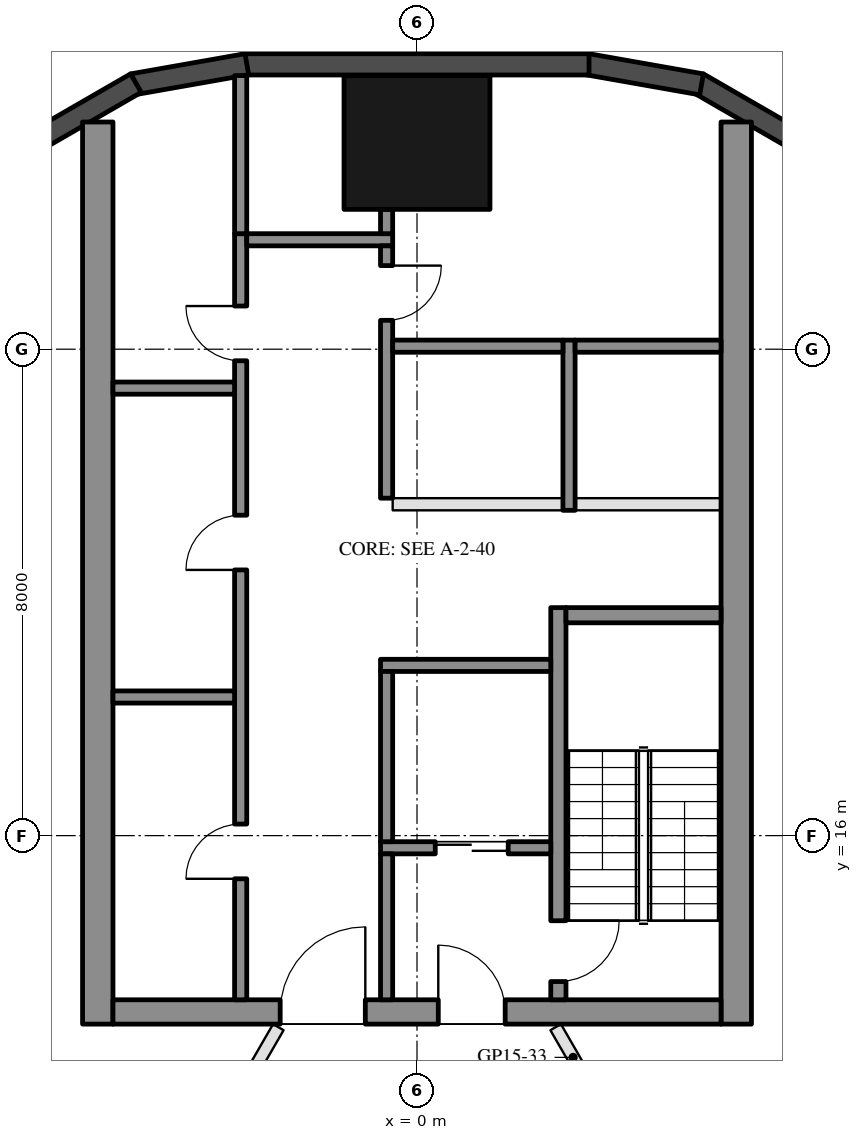
"""IFC4 building model, lengths in metres.
Left out: names, types, materials, properties, quantities, classifications, styles, units other than length and angle.
Written with IfcOpenShell. Run it as: python <this file> out.ifc"""

import sys

from ifc_helpers import new_model, si_unit, direction, frame, frame_2d, origin, origin_2d, place, context, subcontext, project, spatial, rectangle, hollow_rectangle, extrude, element, fill, save


model = new_model("IFC4")
c1 = context("Model", 3, precision=1e-05, world=origin(), true_north=direction((0.0, 1.0)))
c2 = subcontext(c1, "Body", "Model", "MODEL_VIEW")
j1 = project(units=[si_unit("LENGTHUNIT", "METRE"), si_unit("PLANEANGLEUNIT", "RADIAN")], contexts=[c1])
p1 = place(None, origin())
s1 = spatial("IfcSite", under=j1, at=p1, CompositionType="ELEMENT")
p2 = place(p1, origin())
s2 = spatial("IfcBuilding", under=s1, at=p2, CompositionType="ELEMENT")
p3 = place(p2, frame((0.0, 0.0, 172.5)))
s3 = spatial("IfcBuildingStorey", under=s2, at=p3, CompositionType="ELEMENT", Elevation=172.5)
p4 = place(p3, frame((0.0, 27.4, 0.0), z_axis=(0.0, 0.0, 1.0), x_axis=(1.0, 0.0, 0.0)))
e1 = element("IfcColumn", 1, at=p4, inside=s3, PredefinedType="COLUMN", context=c2, shape_type="SweptSolid", body=[
    extrude(hollow_rectangle(XDim=2.4, YDim=2.2, WallThickness=0.06, at=origin_2d()), origin(), (0.0, 0.0, 1.0), 3.7),
])
for number, where, z_axis, x_axis in (
    (2, (6.277, 27.422, 0.0), (0.0, 0.0, 1.0), (-0.866, 0.5, 0.0)),
    (3, (4.68, 28.356, 0.0), (0.0, 0.0, 1.0), (-0.985, 0.174, 0.0)),
):
    element("IfcWall", number, at=place(p3, frame(where, z_axis=z_axis, x_axis=x_axis)), inside=s3, PredefinedType="SOLIDWALL", context=c2, shape_type="SweptSolid", body=[
        extrude(rectangle(XDim=1.91, YDim=0.35, at=frame_2d((0.955, 0.0))), origin(), (0.0, 0.0, 1.0), 3.55),
    ])
p5 = place(p3, frame((2.829, 28.685, 0.0), z_axis=(0.0, 0.0, 1.0), x_axis=(-1.0, 0.0, 0.0)))
e4 = element("IfcWall", 4, at=p5, inside=s3, PredefinedType="SOLIDWALL", context=c2, shape_type="SweptSolid", body=[
    extrude(rectangle(XDim=5.658, YDim=0.35, at=frame_2d((2.829, 0.0))), origin(), (0.0, 0.0, 1.0), 3.55),
])
for number, where, z_axis, x_axis in (
    (5, (-2.799, 28.688, 0.0), (0.0, 0.0, 1.0), (-0.985, -0.174, 0.0)),
    (6, (-4.623, 28.377, 0.0), (0.0, 0.0, 1.0), (-0.866, -0.5, 0.0)),
):
    element("IfcWall", number, at=place(p3, frame(where, z_axis=z_axis, x_axis=x_axis)), inside=s3, PredefinedType="SOLIDWALL", context=c2, shape_type="SweptSolid", body=[
        extrude(rectangle(XDim=1.91, YDim=0.35, at=frame_2d((0.955, 0.0))), origin(), (0.0, 0.0, 1.0), 3.55),
    ])
for number, where, z_axis, x_axis in (
    (7, (5.25, 12.9, 0.0), (0.0, 0.0, 1.0), (0.0, 1.0, 0.0)),
    (8, (-5.25, 12.9, 0.0), (0.0, 0.0, 1.0), (0.0, 1.0, 0.0)),
):
    element("IfcWall", number, at=place(p3, frame(where, z_axis=z_axis, x_axis=x_axis)), inside=s3, PredefinedType="SHEAR", context=c2, shape_type="SweptSolid", body=[
        extrude(rectangle(XDim=14.837, YDim=0.5, at=frame_2d((7.418, 0.0))), origin(), (0.0, 0.0, 1.0), 3.5),
    ])
p6 = place(p3, frame((5.0, 13.1, 0.0), z_axis=(0.0, 0.0, 1.0), x_axis=(-1.0, 0.0, 0.0)))
e9 = element("IfcWall", 9, at=p6, inside=s3, PredefinedType="SHEAR", context=c2, shape_type="SweptSolid", body=[
    extrude(rectangle(XDim=10.0, YDim=0.4, at=frame_2d((5.0, 0.0))), origin(), (0.0, 0.0, 1.0), 3.5),
])
p7 = place(p6, frame((3.55, 0.0, 0.0)))
e10 = element("IfcOpeningElement", 10, at=p7, cuts=e9, PredefinedType="OPENING", context=c2, shape_type="SweptSolid", body=[
    extrude(rectangle(XDim=1.1, YDim=2.1, at=frame_2d((0.55, 1.05))), frame((0.0, 0.21, 0.0), z_axis=(0.0, -1.0, 0.0), x_axis=(1.0, 0.0, 0.0)), (0.0, 0.0, 1.0), 0.42),
])
p8 = place(p6, frame((5.85, 0.0, 0.0)))
e11 = element("IfcOpeningElement", 11, at=p8, cuts=e9, PredefinedType="OPENING", context=c2, shape_type="SweptSolid", body=[
    extrude(rectangle(XDim=1.4, YDim=2.1, at=frame_2d((0.7, 1.05))), frame((0.0, 0.21, 0.0), z_axis=(0.0, -1.0, 0.0), x_axis=(1.0, 0.0, 0.0)), (0.0, 0.0, 1.0), 0.42),
])
p9 = place(p3, frame((2.325, 13.3, 0.0), z_axis=(0.0, 0.0, 1.0), x_axis=(0.0, 1.0, 0.0)))
e12 = element("IfcWall", 12, at=p9, inside=s3, PredefinedType="SHEAR", context=c2, shape_type="SweptSolid", body=[
    extrude(rectangle(XDim=6.45, YDim=0.25, at=frame_2d((3.225, 0.0))), origin(), (0.0, 0.0, 1.0), 3.5),
])
p10 = place(p9, frame((0.3, 0.0, 0.0)))
e13 = element("IfcOpeningElement", 13, at=p10, cuts=e12, PredefinedType="OPENING", context=c2, shape_type="SweptSolid", body=[
    extrude(rectangle(XDim=1.0, YDim=2.1, at=frame_2d((0.5, 1.05))), frame((0.0, 0.135, 0.0), z_axis=(0.0, -1.0, 0.0), x_axis=(1.0, 0.0, 0.0)), (0.0, 0.0, 1.0), 0.27),
])
p11 = place(p3, frame((5.0, 19.625, 0.0), z_axis=(0.0, 0.0, 1.0), x_axis=(-1.0, 0.0, 0.0)))
e14 = element("IfcWall", 14, at=p11, inside=s3, PredefinedType="SHEAR", context=c2, shape_type="SweptSolid", body=[
    extrude(rectangle(XDim=2.55, YDim=0.25, at=frame_2d((1.275, 0.0))), origin(), (0.0, 0.0, 1.0), 3.5),
])
p12 = place(p3, frame((2.2, 18.8, 0.0), z_axis=(0.0, 0.0, 1.0), x_axis=(-1.0, 0.0, 0.0)))
e15 = element("IfcWall", 15, at=p12, inside=s3, PredefinedType="SHEAR", context=c2, shape_type="SweptSolid", body=[
    extrude(rectangle(XDim=2.8, YDim=0.2, at=frame_2d((1.4, 0.0))), origin(), (0.0, 0.0, 1.0), 3.5),
])
p13 = place(p3, frame((2.2, 15.8, 0.0), z_axis=(0.0, 0.0, 1.0), x_axis=(-1.0, 0.0, 0.0)))
e16 = element("IfcWall", 16, at=p13, inside=s3, PredefinedType="SHEAR", context=c2, shape_type="SweptSolid", body=[
    extrude(rectangle(XDim=2.8, YDim=0.2, at=frame_2d((1.4, 0.0))), origin(), (0.0, 0.0, 1.0), 3.5),
])
p14 = place(p13, frame((0.7, 0.0, 0.0)))
e17 = element("IfcOpeningElement", 17, at=p14, cuts=e16, PredefinedType="OPENING", context=c2, shape_type="SweptSolid", body=[
    extrude(rectangle(XDim=1.2, YDim=2.1, at=frame_2d((0.6, 1.05))), frame((0.0, 0.11, 0.0), z_axis=(0.0, -1.0, 0.0), x_axis=(1.0, 0.0, 0.0)), (0.0, 0.0, 1.0), 0.22),
])
p15 = place(p3, frame((-0.5, 15.9, 0.0), z_axis=(0.0, 0.0, 1.0), x_axis=(0.0, 1.0, 0.0)))
e18 = element("IfcWall", 18, at=p15, inside=s3, PredefinedType="SHEAR", context=c2, shape_type="SweptSolid", body=[
    extrude(rectangle(XDim=2.8, YDim=0.2, at=frame_2d((1.4, 0.0))), origin(), (0.0, 0.0, 1.0), 3.5),
])
p16 = place(p3, frame((-0.5, 13.3, 0.0), z_axis=(0.0, 0.0, 1.0), x_axis=(0.0, 1.0, 0.0)))
e19 = element("IfcWall", 19, at=p16, inside=s3, PredefinedType="SHEAR", context=c2, shape_type="SweptSolid", body=[
    extrude(rectangle(XDim=2.4, YDim=0.2, at=frame_2d((1.2, 0.0))), origin(), (0.0, 0.0, 1.0), 3.5),
])
p17 = place(p3, frame((-2.9, 13.3, 0.0), z_axis=(0.0, 0.0, 1.0), x_axis=(0.0, 1.0, 0.0)))
e20 = element("IfcWall", 20, at=p17, inside=s3, PredefinedType="SHEAR", context=c2, shape_type="SweptSolid", body=[
    extrude(rectangle(XDim=12.6, YDim=0.2, at=frame_2d((6.3, 0.0))), origin(), (0.0, 0.0, 1.0), 3.5),
])
p18 = place(p17, frame((1.99, 0.0, 0.0)))
e21 = element("IfcOpeningElement", 21, at=p18, cuts=e20, PredefinedType="OPENING", context=c2, shape_type="SweptSolid", body=[
    extrude(rectangle(XDim=0.9, YDim=2.1, at=frame_2d((0.45, 1.05))), frame((0.0, 0.11, 0.0), z_axis=(0.0, -1.0, 0.0), x_axis=(1.0, 0.0, 0.0)), (0.0, 0.0, 1.0), 0.22),
])
p19 = place(p17, frame((7.07, 0.0, 0.0)))
e22 = element("IfcOpeningElement", 22, at=p19, cuts=e20, PredefinedType="OPENING", context=c2, shape_type="SweptSolid", body=[
    extrude(rectangle(XDim=0.9, YDim=2.1, at=frame_2d((0.45, 1.05))), frame((0.0, 0.11, 0.0), z_axis=(0.0, -1.0, 0.0), x_axis=(1.0, 0.0, 0.0)), (0.0, 0.0, 1.0), 0.22),
])
p20 = place(p17, frame((10.51, 0.0, 0.0)))
e23 = element("IfcOpeningElement", 23, at=p20, cuts=e20, PredefinedType="OPENING", context=c2, shape_type="SweptSolid", body=[
    extrude(rectangle(XDim=0.9, YDim=2.1, at=frame_2d((0.45, 1.05))), frame((0.0, 0.11, 0.0), z_axis=(0.0, -1.0, 0.0), x_axis=(1.0, 0.0, 0.0)), (0.0, 0.0, 1.0), 0.22),
])
p21 = place(p3, frame((-0.4, 25.8, 0.0), z_axis=(0.0, 0.0, 1.0), x_axis=(-1.0, 0.0, 0.0)))
e24 = element("IfcWall", 24, at=p21, inside=s3, PredefinedType="SHEAR", context=c2, shape_type="SweptSolid", body=[
    extrude(rectangle(XDim=2.4, YDim=0.2, at=frame_2d((1.2, 0.0))), origin(), (0.0, 0.0, 1.0), 3.5),
])
p22 = place(p3, frame((-0.5, 21.55, 0.0), z_axis=(0.0, 0.0, 1.0), x_axis=(0.0, 1.0, 0.0)))
e25 = element("IfcWall", 25, at=p22, inside=s3, PredefinedType="SHEAR", context=c2, shape_type="SweptSolid", body=[
    extrude(rectangle(XDim=4.15, YDim=0.2, at=frame_2d((2.075, 0.0))), origin(), (0.0, 0.0, 1.0), 3.5),
])
p23 = place(p22, frame((2.925, 0.0, 0.0)))
e26 = element("IfcOpeningElement", 26, at=p23, cuts=e25, PredefinedType="OPENING", context=c2, shape_type="SweptSolid", body=[
    extrude(rectangle(XDim=0.9, YDim=2.1, at=frame_2d((0.45, 1.05))), frame((0.0, 0.11, 0.0), z_axis=(0.0, -1.0, 0.0), x_axis=(1.0, 0.0, 0.0)), (0.0, 0.0, 1.0), 0.22),
])
for number, where, z_axis, x_axis in (
    (27, (-3.0, 18.28, 0.0), (0.0, 0.0, 1.0), (-1.0, 0.0, 0.0)),
    (28, (-3.0, 23.36, 0.0), (0.0, 0.0, 1.0), (-1.0, 0.0, 0.0)),
):
    element("IfcWall", number, at=place(p3, frame(where, z_axis=z_axis, x_axis=x_axis)), inside=s3, PredefinedType="SHEAR", context=c2, shape_type="SweptSolid", body=[
        extrude(rectangle(XDim=2.0, YDim=0.2, at=frame_2d((1.0, 0.0))), origin(), (0.0, 0.0, 1.0), 3.5),
    ])
p24 = place(p3, frame((-0.5, 25.9, 0.0), z_axis=(0.0, 0.0, 1.0), x_axis=(0.0, 1.0, 0.0)))
e29 = element("IfcWall", 29, at=p24, inside=s3, PredefinedType="SHEAR", context=c2, shape_type="SweptSolid", body=[
    extrude(rectangle(XDim=0.4, YDim=0.2, at=frame_2d((0.2, 0.0))), origin(), (0.0, 0.0, 1.0), 3.5),
])
p25 = place(p3, frame((-2.9, 25.9, 0.0), z_axis=(0.0, 0.0, 1.0), x_axis=(0.0, 1.0, 0.0)))
e30 = element("IfcWall", 30, at=p25, inside=s3, PredefinedType="SHEAR", context=c2, shape_type="SweptSolid", body=[
    extrude(rectangle(XDim=2.6, YDim=0.2, at=frame_2d((1.3, 0.0))), origin(), (0.0, 0.0, 1.0), 3.5),
])
p26 = place(p3, frame((2.5, 21.35, 0.0), z_axis=(0.0, 0.0, 1.0), x_axis=(0.0, 1.0, 0.0)))
e31 = element("IfcWall", 31, at=p26, inside=s3, PredefinedType="SHEAR", context=c2, shape_type="SweptSolid", body=[
    extrude(rectangle(XDim=2.8, YDim=0.2, at=frame_2d((1.4, 0.0))), origin(), (0.0, 0.0, 1.0), 3.5),
])
p27 = place(p3, frame((5.0, 24.05, 0.0), z_axis=(0.0, 0.0, 1.0), x_axis=(-1.0, 0.0, 0.0)))
e32 = element("IfcWall", 32, at=p27, inside=s3, PredefinedType="SHEAR", context=c2, shape_type="SweptSolid", body=[
    extrude(rectangle(XDim=2.4, YDim=0.2, at=frame_2d((1.2, 0.0))), origin(), (0.0, 0.0, 1.0), 3.5),
])
p28 = place(p3, frame((2.4, 24.05, 0.0), z_axis=(0.0, 0.0, 1.0), x_axis=(-1.0, 0.0, 0.0)))
e33 = element("IfcWall", 33, at=p28, inside=s3, PredefinedType="SHEAR", context=c2, shape_type="SweptSolid", body=[
    extrude(rectangle(XDim=2.8, YDim=0.2, at=frame_2d((1.4, 0.0))), origin(), (0.0, 0.0, 1.0), 3.5),
])
p29 = place(p3, frame((5.0, 21.45, 0.0), z_axis=(0.0, 0.0, 1.0), x_axis=(-1.0, 0.0, 0.0)))
e34 = element("IfcWall", 34, at=p29, inside=s3, PredefinedType="PARTITIONING", context=c2, shape_type="SweptSolid", body=[
    extrude(rectangle(XDim=2.4, YDim=0.2, at=frame_2d((1.2, 0.0))), origin(), (0.0, 0.0, 1.0), 3.5),
])
p30 = place(p3, frame((2.4, 21.45, 0.0), z_axis=(0.0, 0.0, 1.0), x_axis=(-1.0, 0.0, 0.0)))
e35 = element("IfcWall", 35, at=p30, inside=s3, PredefinedType="PARTITIONING", context=c2, shape_type="SweptSolid", body=[
    extrude(rectangle(XDim=2.8, YDim=0.2, at=frame_2d((1.4, 0.0))), origin(), (0.0, 0.0, 1.0), 3.5),
])
p31 = place(p3, frame((14.402, 13.615, 0.0), z_axis=(0.0, 0.0, 1.0), x_axis=(-0.888691893785, -0.458504872299, 0.0)))
e36 = element("IfcWall", 36, at=p31, inside=s3, PredefinedType="PARTITIONING", context=c2, shape_type="SweptSolid", body=[
    extrude(rectangle(XDim=10.992, YDim=0.2, at=frame_2d((5.496, 0.0))), origin(), (0.0, 0.0, 1.0), 3.06),
])
p32 = place(p3, frame((-13.42, 13.517, 0.0), z_axis=(0.0, 0.0, 1.0), x_axis=(0.890385665103, -0.455206950056, 0.0)))
e37 = element("IfcWall", 37, at=p32, inside=s3, PredefinedType="PARTITIONING", context=c2, shape_type="SweptSolid", body=[
    extrude(rectangle(XDim=10.093, YDim=0.2, at=frame_2d((5.047, 0.0))), origin(), (0.0, 0.0, 1.0), 3.06),
])
p33 = place(p3, frame((2.281, 12.85, 0.0), z_axis=(0.0, 0.0, 1.0), x_axis=(0.499981649923, -0.866035997947, 0.0)))
e38 = element("IfcWall", 38, at=p33, inside=s3, PredefinedType="PARTITIONING", context=c2, shape_type="SweptSolid", body=[
    extrude(rectangle(XDim=4.783, YDim=0.2, at=frame_2d((2.392, 0.0))), origin(), (0.0, 0.0, 1.0), 2.95),
])
p34 = place(p33, frame((1.892, 0.0, 0.0)))
e39 = element("IfcOpeningElement", 39, at=p34, cuts=e38, PredefinedType="OPENING", context=c2, shape_type="SweptSolid", body=[
    extrude(rectangle(XDim=1.0, YDim=2.1, at=frame_2d((0.5, 1.05))), frame((0.0, 0.11, 0.0), z_axis=(0.0, -1.0, 0.0), x_axis=(1.0, 0.0, 0.0)), (0.0, 0.0, 1.0), 0.22),
])
p35 = place(p3, frame((-4.472, 9.054, 0.0), z_axis=(0.0, 0.0, 1.0), x_axis=(0.499973180286, 0.8660408876, 0.0)))
e40 = element("IfcWall", 40, at=p35, inside=s3, PredefinedType="PARTITIONING", context=c2, shape_type="SweptSolid", body=[
    extrude(rectangle(XDim=4.383, YDim=0.2, at=frame_2d((2.191, 0.0))), origin(), (0.0, 0.0, 1.0), 2.95),
])
p36 = place(p35, frame((1.691, 0.0, 0.0)))
e41 = element("IfcOpeningElement", 41, at=p36, cuts=e40, PredefinedType="OPENING", context=c2, shape_type="SweptSolid", body=[
    extrude(rectangle(XDim=1.0, YDim=2.1, at=frame_2d((0.5, 1.05))), frame((0.0, 0.11, 0.0), z_axis=(0.0, -1.0, 0.0), x_axis=(1.0, 0.0, 0.0)), (0.0, 0.0, 1.0), 0.22),
])
p37 = place(p14, origin())
e42 = element("IfcDoor", 42, at=p37, inside=s3, OperationType="DOUBLE_DOOR_SLIDING", PredefinedType="DOOR", context=c2, shape_type="SweptSolid", body=[
    extrude(rectangle(XDim=1.2, YDim=2.1, at=frame_2d((0.6, 1.05))), frame((0.0, 0.025, 0.0), z_axis=(0.0, -1.0, 0.0), x_axis=(1.0, 0.0, 0.0)), (0.0, 0.0, 1.0), 0.05),
])
fill(e17, e42)
p38 = place(p18, origin())
e43 = element("IfcDoor", 43, at=p38, inside=s3, OperationType="SINGLE_SWING_LEFT", PredefinedType="DOOR", context=c2, shape_type="SweptSolid", body=[
    extrude(rectangle(XDim=0.9, YDim=2.1, at=frame_2d((0.45, 1.05))), frame((0.0, 0.025, 0.0), z_axis=(0.0, -1.0, 0.0), x_axis=(1.0, 0.0, 0.0)), (0.0, 0.0, 1.0), 0.05),
])
fill(e21, e43)
p39 = place(p19, origin())
e44 = element("IfcDoor", 44, at=p39, inside=s3, OperationType="SINGLE_SWING_LEFT", PredefinedType="DOOR", context=c2, shape_type="SweptSolid", body=[
    extrude(rectangle(XDim=0.9, YDim=2.1, at=frame_2d((0.45, 1.05))), frame((0.0, 0.025, 0.0), z_axis=(0.0, -1.0, 0.0), x_axis=(1.0, 0.0, 0.0)), (0.0, 0.0, 1.0), 0.05),
])
fill(e22, e44)
p40 = place(p20, origin())
e45 = element("IfcDoor", 45, at=p40, inside=s3, OperationType="SINGLE_SWING_RIGHT", PredefinedType="DOOR", context=c2, shape_type="SweptSolid", body=[
    extrude(rectangle(XDim=0.9, YDim=2.1, at=frame_2d((0.45, 1.05))), frame((0.0, 0.025, 0.0), z_axis=(0.0, -1.0, 0.0), x_axis=(1.0, 0.0, 0.0)), (0.0, 0.0, 1.0), 0.05),
])
fill(e23, e45)
p41 = place(p23, frame((0.9, 0.0, 0.0), z_axis=(0.0, 0.0, 1.0), x_axis=(-1.0, 0.0, 0.0)))
e46 = element("IfcDoor", 46, at=p41, inside=s3, OperationType="SINGLE_SWING_LEFT", PredefinedType="DOOR", context=c2, shape_type="SweptSolid", body=[
    extrude(rectangle(XDim=0.9, YDim=2.1, at=frame_2d((0.45, 1.05))), frame((0.0, 0.025, 0.0), z_axis=(0.0, -1.0, 0.0), x_axis=(1.0, 0.0, 0.0)), (0.0, 0.0, 1.0), 0.05),
])
fill(e26, e46)
p42 = place(p7, frame((1.1, 0.0, 0.0), z_axis=(0.0, 0.0, 1.0), x_axis=(-1.0, 0.0, 0.0)))
e47 = element("IfcDoor", 47, at=p42, inside=s3, OperationType="SINGLE_SWING_LEFT", PredefinedType="DOOR", context=c2, shape_type="SweptSolid", body=[
    extrude(rectangle(XDim=1.1, YDim=2.1, at=frame_2d((0.55, 1.05))), frame((0.0, 0.025, 0.0), z_axis=(0.0, -1.0, 0.0), x_axis=(1.0, 0.0, 0.0)), (0.0, 0.0, 1.0), 0.05),
])
fill(e10, e47)
p43 = place(p8, frame((1.4, 0.0, 0.0), z_axis=(0.0, 0.0, 1.0), x_axis=(-1.0, 0.0, 0.0)))
e48 = element("IfcDoor", 48, at=p43, inside=s3, OperationType="DOUBLE_DOOR_SINGLE_SWING", PredefinedType="DOOR", context=c2, shape_type="SweptSolid", body=[
    extrude(rectangle(XDim=1.4, YDim=2.1, at=frame_2d((0.7, 1.05))), frame((0.0, 0.025, 0.0), z_axis=(0.0, -1.0, 0.0), x_axis=(1.0, 0.0, 0.0)), (0.0, 0.0, 1.0), 0.05),
])
fill(e11, e48)
p44 = place(p10, frame((1.0, 0.0, 0.0), z_axis=(0.0, 0.0, 1.0), x_axis=(-1.0, 0.0, 0.0)))
e49 = element("IfcDoor", 49, at=p44, inside=s3, OperationType="SINGLE_SWING_LEFT", PredefinedType="DOOR", context=c2, shape_type="SweptSolid", body=[
    extrude(rectangle(XDim=1.0, YDim=2.1, at=frame_2d((0.5, 1.05))), frame((0.0, 0.025, 0.0), z_axis=(0.0, -1.0, 0.0), x_axis=(1.0, 0.0, 0.0)), (0.0, 0.0, 1.0), 0.05),
])
fill(e13, e49)
save(model, sys.argv[1])
